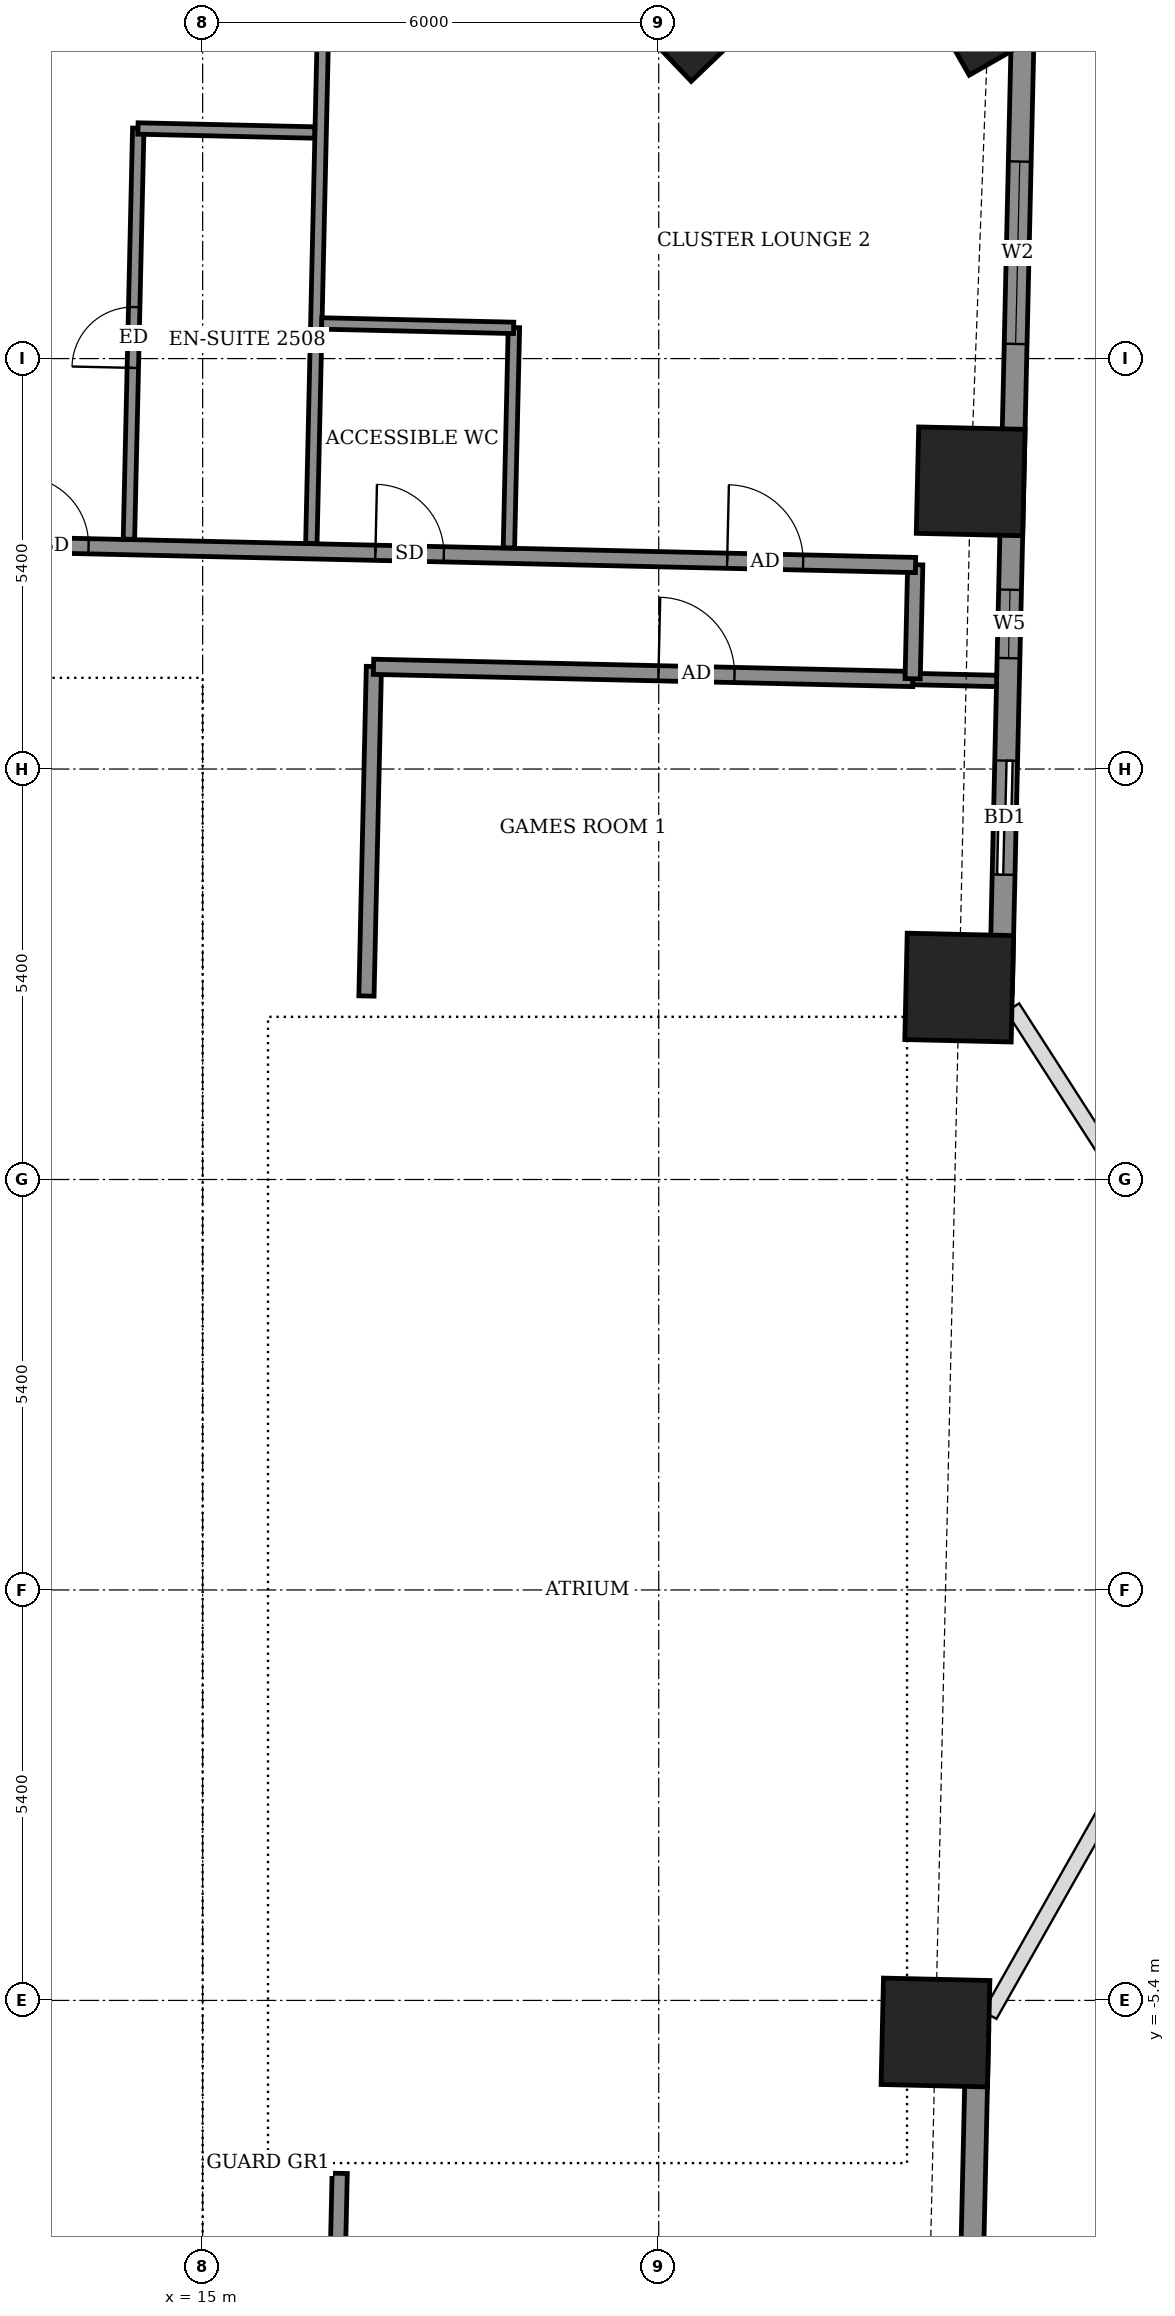
"""IFC4 building model, lengths in metres.
Left out: names, types, materials, properties, quantities, classifications, styles, units other than length and angle.
Written with IfcOpenShell. Run it as: python <this file> out.ifc"""

import sys

from ifc_helpers import new_model, si_unit, direction, frame, frame_2d, origin, origin_2d, place, context, subcontext, project, spatial, rectangle, extrude, element, fill, save


model = new_model("IFC4")
c1 = context("Model", 3, precision=1e-05, world=origin(), true_north=direction((0.0, 1.0)))
c2 = subcontext(c1, "Body", "Model", "MODEL_VIEW")
j1 = project(units=[si_unit("LENGTHUNIT", "METRE"), si_unit("PLANEANGLEUNIT", "RADIAN")], contexts=[c1])
p1 = place(None, origin())
s1 = spatial("IfcSite", under=j1, at=p1, CompositionType="ELEMENT")
p2 = place(p1, origin())
s2 = spatial("IfcBuilding", under=s1, at=p2, CompositionType="ELEMENT")
p3 = place(p2, frame((0.0, 0.0, 101.9)))
s3 = spatial("IfcBuildingStorey", under=s2, at=p3, CompositionType="ELEMENT", Elevation=101.9)
for number, where, z_axis, x_axis in (
    (1, (24.641, -5.822, -0.55), (0.0, 0.0, 1.0), (0.023, 1.0, 0.0)),
    (2, (24.953, 7.925, -0.55), (0.0, 0.0, 1.0), (0.023, 1.0, 0.0)),
    (3, (25.104, 14.585, -0.55), (0.0, 0.0, 1.0), (0.023, 1.0, 0.0)),
    (4, (25.347, 20.883, -0.55), (0.0, 0.0, 1.0), (-0.495, 0.869, 0.0)),
    (5, (21.45, 20.837, -0.55), (0.0, 0.0, 1.0), (-0.691, 0.723, 0.0)),
):
    element("IfcColumn", number, at=place(p3, frame(where, z_axis=z_axis, x_axis=x_axis)), inside=s3, PredefinedType="COLUMN", context=c2, shape_type="SweptSolid", body=[
        extrude(rectangle(XDim=1.4, YDim=1.4, at=origin_2d()), origin(), (0.0, 0.0, 1.0), 3.6),
    ])
p4 = place(p3, frame((24.915, -18.007, 0.0), z_axis=(0.0, 0.0, 1.0), x_axis=(0.02263706344, 0.999743748847, 0.0)))
e6 = element("IfcWall", 6, at=p4, inside=s3, PredefinedType="SOLIDWALL", context=c2, shape_type="SweptSolid", body=[
    extrude(rectangle(XDim=12.23, YDim=0.3, at=frame_2d((6.115, 0.0))), origin(), (0.0, 0.0, 1.0), 3.05),
])
p5 = place(p4, frame((2.213, 0.0, 0.0)))
e7 = element("IfcOpeningElement", 7, at=p5, cuts=e6, PredefinedType="OPENING", context=c2, shape_type="SweptSolid", body=[
    extrude(rectangle(XDim=1.5, YDim=2.4, at=frame_2d((0.75, 1.2))), frame((0.0, 0.16, 0.0), z_axis=(0.0, -1.0, 0.0), x_axis=(1.0, 0.0, 0.0)), (0.0, 0.0, 1.0), 0.32),
])
p6 = place(p4, frame((7.027, 0.0, 0.9)))
e8 = element("IfcOpeningElement", 8, at=p6, cuts=e6, PredefinedType="OPENING", context=c2, shape_type="SweptSolid", body=[
    extrude(rectangle(XDim=2.4, YDim=1.5, at=frame_2d((1.2, 0.75))), frame((0.0, 0.16, 0.0), z_axis=(0.0, -1.0, 0.0), x_axis=(1.0, 0.0, 0.0)), (0.0, 0.0, 1.0), 0.32),
])
p7 = place(p3, frame((25.502, 7.857, 0.0), z_axis=(0.0, 0.0, 1.0), x_axis=(0.022680323815, 0.999742768372, 0.0)))
e9 = element("IfcWall", 9, at=p7, inside=s3, PredefinedType="SOLIDWALL", context=c2, shape_type="SweptSolid", body=[
    extrude(rectangle(XDim=13.229, YDim=0.3, at=frame_2d((6.615, 0.0))), origin(), (0.0, 0.0, 1.0), 3.05),
])
p8 = place(p7, frame((1.554, 0.0, 0.0)))
e10 = element("IfcOpeningElement", 10, at=p8, cuts=e9, PredefinedType="OPENING", context=c2, shape_type="SweptSolid", body=[
    extrude(rectangle(XDim=1.5, YDim=2.4, at=frame_2d((0.75, 1.2))), frame((0.0, 0.16, 0.0), z_axis=(0.0, -1.0, 0.0), x_axis=(1.0, 0.0, 0.0)), (0.0, 0.0, 1.0), 0.32),
])
p9 = place(p7, frame((4.403, 0.0, 0.9)))
e11 = element("IfcOpeningElement", 11, at=p9, cuts=e9, PredefinedType="OPENING", context=c2, shape_type="SweptSolid", body=[
    extrude(rectangle(XDim=0.9, YDim=1.5, at=frame_2d((0.45, 0.75))), frame((0.0, 0.16, 0.0), z_axis=(0.0, -1.0, 0.0), x_axis=(1.0, 0.0, 0.0)), (0.0, 0.0, 1.0), 0.32),
])
p10 = place(p7, frame((8.538, 0.0, 0.9)))
e12 = element("IfcOpeningElement", 12, at=p10, cuts=e9, PredefinedType="OPENING", context=c2, shape_type="SweptSolid", body=[
    extrude(rectangle(XDim=2.4, YDim=1.5, at=frame_2d((1.2, 0.75))), frame((0.0, 0.16, 0.0), z_axis=(0.0, -1.0, 0.0), x_axis=(1.0, 0.0, 0.0)), (0.0, 0.0, 1.0), 0.32),
])
p11 = place(p3, frame((16.684, -12.919, 0.0), z_axis=(0.0, 0.0, 1.0), x_axis=(0.022667483124, 0.999743059595, 0.0)))
e13 = element("IfcWall", 13, at=p11, inside=s3, PredefinedType="PARTITIONING", context=c2, shape_type="SweptSolid", body=[
    extrude(rectangle(XDim=5.245, YDim=0.2, at=frame_2d((2.623, 0.0))), origin(), (0.0, 0.0, 1.0), 3.05),
])
p12 = place(p3, frame((17.155, 7.814, 0.0), z_axis=(0.0, 0.0, 1.0), x_axis=(0.022578158225, 0.999745080894, 0.0)))
e14 = element("IfcWall", 14, at=p12, inside=s3, PredefinedType="PARTITIONING", context=c2, shape_type="SweptSolid", body=[
    extrude(rectangle(XDim=4.336, YDim=0.2, at=frame_2d((2.168, 0.0))), origin(), (0.0, 0.0, 1.0), 3.05),
])
p13 = place(p3, frame((17.248, 12.145, 0.0), z_axis=(0.0, 0.0, 1.0), x_axis=(0.999742350192, -0.022698749566, 0.0)))
e15 = element("IfcWall", 15, at=p13, inside=s3, PredefinedType="PARTITIONING", context=c2, shape_type="SweptSolid", body=[
    extrude(rectangle(XDim=7.099, YDim=0.2, at=frame_2d((3.549, 0.0))), origin(), (0.0, 0.0, 1.0), 3.05),
])
p14 = place(p13, frame((3.75, 0.0, 0.0)))
e16 = element("IfcOpeningElement", 16, at=p14, cuts=e15, PredefinedType="OPENING", context=c2, shape_type="SweptSolid", body=[
    extrude(rectangle(XDim=1.0, YDim=2.1, at=frame_2d((0.5, 1.05))), frame((0.0, 0.11, 0.0), z_axis=(0.0, -1.0, 0.0), x_axis=(1.0, 0.0, 0.0)), (0.0, 0.0, 1.0), 0.22),
])
p15 = place(p3, frame((24.345, 11.984, 0.0), z_axis=(0.0, 0.0, 1.0), x_axis=(0.9997438932, -0.022630687329, 0.0)))
e17 = element("IfcWall", 17, at=p15, inside=s3, PredefinedType="PARTITIONING", context=c2, shape_type="SweptSolid", body=[
    extrude(rectangle(XDim=1.1, YDim=0.15, at=frame_2d((0.55, 0.0))), origin(), (0.0, 0.0, 1.0), 2.55),
])
p16 = place(p3, frame((24.341, 11.988, 0.0), z_axis=(0.0, 0.0, 1.0), x_axis=(0.022617910375, 0.999744182344, 0.0)))
e18 = element("IfcWall", 18, at=p16, inside=s3, PredefinedType="PARTITIONING", context=c2, shape_type="SweptSolid", body=[
    extrude(rectangle(XDim=1.5, YDim=0.2, at=frame_2d((0.75, 0.0))), origin(), (0.0, 0.0, 1.0), 3.05),
])
p17 = place(p3, frame((-26.316, 14.634, 0.0), z_axis=(0.0, 0.0, 1.0), x_axis=(0.999742734556, -0.02268181435, 0.0)))
e19 = element("IfcWall", 19, at=p17, inside=s3, PredefinedType="PARTITIONING", context=c2, shape_type="SweptSolid", body=[
    extrude(rectangle(XDim=50.708, YDim=0.2, at=frame_2d((25.354, 0.0))), origin(), (0.0, 0.0, 1.0), 3.05),
])
p18 = place(p17, frame((48.229, 0.0, 0.0)))
e20 = element("IfcOpeningElement", 20, at=p18, cuts=e19, PredefinedType="OPENING", context=c2, shape_type="SweptSolid", body=[
    extrude(rectangle(XDim=1.0, YDim=2.1, at=frame_2d((0.5, 1.05))), frame((0.0, 0.11, 0.0), z_axis=(0.0, -1.0, 0.0), x_axis=(1.0, 0.0, 0.0)), (0.0, 0.0, 1.0), 0.22),
])
p19 = place(p17, frame((43.6, 0.0, 0.0)))
e21 = element("IfcOpeningElement", 21, at=p19, cuts=e19, PredefinedType="OPENING", context=c2, shape_type="SweptSolid", body=[
    extrude(rectangle(XDim=0.9, YDim=2.1, at=frame_2d((0.45, 1.05))), frame((0.0, 0.11, 0.0), z_axis=(0.0, -1.0, 0.0), x_axis=(1.0, 0.0, 0.0)), (0.0, 0.0, 1.0), 0.22),
])
p20 = place(p17, frame((38.925, 0.0, 0.0)))
e22 = element("IfcOpeningElement", 22, at=p20, cuts=e19, PredefinedType="OPENING", context=c2, shape_type="SweptSolid", body=[
    extrude(rectangle(XDim=0.9, YDim=2.1, at=frame_2d((0.45, 1.05))), frame((0.0, 0.11, 0.0), z_axis=(0.0, -1.0, 0.0), x_axis=(1.0, 0.0, 0.0)), (0.0, 0.0, 1.0), 0.22),
])
p21 = place(p17, frame((36.9, 0.0, 0.0)))
e23 = element("IfcOpeningElement", 23, at=p21, cuts=e19, PredefinedType="OPENING", context=c2, shape_type="SweptSolid", body=[
    extrude(rectangle(XDim=0.9, YDim=2.1, at=frame_2d((0.45, 1.05))), frame((0.0, 0.11, 0.0), z_axis=(0.0, -1.0, 0.0), x_axis=(1.0, 0.0, 0.0)), (0.0, 0.0, 1.0), 0.22),
])
p22 = place(p17, frame((29.975, 0.0, 0.0)))
e24 = element("IfcOpeningElement", 24, at=p22, cuts=e19, PredefinedType="OPENING", context=c2, shape_type="SweptSolid", body=[
    extrude(rectangle(XDim=0.9, YDim=2.1, at=frame_2d((0.45, 1.05))), frame((0.0, 0.11, 0.0), z_axis=(0.0, -1.0, 0.0), x_axis=(1.0, 0.0, 0.0)), (0.0, 0.0, 1.0), 0.22),
])
p23 = place(p17, frame((27.9, 0.0, 0.0)))
e25 = element("IfcOpeningElement", 25, at=p23, cuts=e19, PredefinedType="OPENING", context=c2, shape_type="SweptSolid", body=[
    extrude(rectangle(XDim=0.9, YDim=2.1, at=frame_2d((0.45, 1.05))), frame((0.0, 0.11, 0.0), z_axis=(0.0, -1.0, 0.0), x_axis=(1.0, 0.0, 0.0)), (0.0, 0.0, 1.0), 0.22),
])
p24 = place(p17, frame((21.175, 0.0, 0.0)))
e26 = element("IfcOpeningElement", 26, at=p24, cuts=e19, PredefinedType="OPENING", context=c2, shape_type="SweptSolid", body=[
    extrude(rectangle(XDim=0.9, YDim=2.1, at=frame_2d((0.45, 1.05))), frame((0.0, 0.11, 0.0), z_axis=(0.0, -1.0, 0.0), x_axis=(1.0, 0.0, 0.0)), (0.0, 0.0, 1.0), 0.22),
])
p25 = place(p17, frame((19.25, 0.0, 0.0)))
e27 = element("IfcOpeningElement", 27, at=p25, cuts=e19, PredefinedType="OPENING", context=c2, shape_type="SweptSolid", body=[
    extrude(rectangle(XDim=0.9, YDim=2.1, at=frame_2d((0.45, 1.05))), frame((0.0, 0.11, 0.0), z_axis=(0.0, -1.0, 0.0), x_axis=(1.0, 0.0, 0.0)), (0.0, 0.0, 1.0), 0.22),
])
p26 = place(p17, frame((12.375, 0.0, 0.0)))
e28 = element("IfcOpeningElement", 28, at=p26, cuts=e19, PredefinedType="OPENING", context=c2, shape_type="SweptSolid", body=[
    extrude(rectangle(XDim=0.9, YDim=2.1, at=frame_2d((0.45, 1.05))), frame((0.0, 0.11, 0.0), z_axis=(0.0, -1.0, 0.0), x_axis=(1.0, 0.0, 0.0)), (0.0, 0.0, 1.0), 0.22),
])
p27 = place(p17, frame((10.225, 0.0, 0.0)))
e29 = element("IfcOpeningElement", 29, at=p27, cuts=e19, PredefinedType="OPENING", context=c2, shape_type="SweptSolid", body=[
    extrude(rectangle(XDim=0.9, YDim=2.1, at=frame_2d((0.45, 1.05))), frame((0.0, 0.11, 0.0), z_axis=(0.0, -1.0, 0.0), x_axis=(1.0, 0.0, 0.0)), (0.0, 0.0, 1.0), 0.22),
])
p28 = place(p17, frame((0.85, 0.0, 0.0)))
e30 = element("IfcOpeningElement", 30, at=p28, cuts=e19, PredefinedType="OPENING", context=c2, shape_type="SweptSolid", body=[
    extrude(rectangle(XDim=1.0, YDim=2.1, at=frame_2d((0.5, 1.05))), frame((0.0, 0.11, 0.0), z_axis=(0.0, -1.0, 0.0), x_axis=(1.0, 0.0, 0.0)), (0.0, 0.0, 1.0), 0.22),
])
p29 = place(p17, frame((5.55, 0.0, 0.0)))
e31 = element("IfcOpeningElement", 31, at=p29, cuts=e19, PredefinedType="OPENING", context=c2, shape_type="SweptSolid", body=[
    extrude(rectangle(XDim=0.9, YDim=2.1, at=frame_2d((0.45, 1.05))), frame((0.0, 0.11, 0.0), z_axis=(0.0, -1.0, 0.0), x_axis=(1.0, 0.0, 0.0)), (0.0, 0.0, 1.0), 0.22),
])
p30 = place(p3, frame((14.03, 13.823, 0.0), z_axis=(0.0, 0.0, 1.0), x_axis=(0.022747035861, 0.999741252705, 0.0)))
e32 = element("IfcWall", 32, at=p30, inside=s3, PredefinedType="PARTITIONING", context=c2, shape_type="SweptSolid", body=[
    extrude(rectangle(XDim=5.409, YDim=0.15, at=frame_2d((2.705, 0.0))), origin(), (0.0, 0.0, 1.0), 3.05),
])
p31 = place(p30, frame((2.255, 0.0, 0.0)))
e33 = element("IfcOpeningElement", 33, at=p31, cuts=e32, PredefinedType="OPENING", context=c2, shape_type="SweptSolid", body=[
    extrude(rectangle(XDim=0.8, YDim=2.1, at=frame_2d((0.4, 1.05))), frame((0.0, 0.085, 0.0), z_axis=(0.0, -1.0, 0.0), x_axis=(1.0, 0.0, 0.0)), (0.0, 0.0, 1.0), 0.17),
])
p32 = place(p3, frame((16.43, 13.768, 0.0), z_axis=(0.0, 0.0, 1.0), x_axis=(0.022624509406, 0.999744033028, 0.0)))
e34 = element("IfcWall", 34, at=p32, inside=s3, PredefinedType="PARTITIONING", context=c2, shape_type="SweptSolid", body=[
    extrude(rectangle(XDim=11.676, YDim=0.15, at=frame_2d((5.838, 0.0))), origin(), (0.0, 0.0, 1.0), 2.55),
])
p33 = place(p3, frame((19.029, 13.709, 0.0), z_axis=(0.0, 0.0, 1.0), x_axis=(0.022732880677, 0.999741574676, 0.0)))
e35 = element("IfcWall", 35, at=p33, inside=s3, PredefinedType="PARTITIONING", context=c2, shape_type="SweptSolid", body=[
    extrude(rectangle(XDim=2.9, YDim=0.15, at=frame_2d((1.45, 0.0))), origin(), (0.0, 0.0, 1.0), 3.05),
])
p34 = place(p3, frame((16.566, 16.662, 0.0), z_axis=(0.0, 0.0, 1.0), x_axis=(0.999735358199, -0.023004642294, 0.0)))
e36 = element("IfcWall", 36, at=p34, inside=s3, PredefinedType="PARTITIONING", context=c2, shape_type="SweptSolid", body=[
    extrude(rectangle(XDim=2.526, YDim=0.15, at=frame_2d((1.263, 0.0))), origin(), (0.0, 0.0, 1.0), 3.05),
])
p35 = place(p3, frame((14.149, 19.227, 0.0), z_axis=(0.0, 0.0, 1.0), x_axis=(0.999740260747, -0.02279059109, 0.0)))
e37 = element("IfcWall", 37, at=p35, inside=s3, PredefinedType="PARTITIONING", context=c2, shape_type="SweptSolid", body=[
    extrude(rectangle(XDim=2.324, YDim=0.15, at=frame_2d((1.162, 0.0))), origin(), (0.0, 0.0, 1.0), 3.05),
])
p36 = place(p3, frame((-14.8, 11.3, 0.0), z_axis=(0.0, 0.0, 1.0), x_axis=(1.0, 0.0, 0.0)))
e38 = element("IfcWall", 38, at=p36, inside=s3, PredefinedType="SHEAR", context=c2, shape_type="SweptSolid", body=[
    extrude(rectangle(XDim=29.6, YDim=1.0, at=frame_2d((14.8, 0.0))), origin(), (0.0, 0.0, 1.0), 3.6),
])
p37 = place(p3, frame((14.3, -10.8, 0.0), z_axis=(0.0, 0.0, 1.0), x_axis=(0.0, 1.0, 0.0)))
e39 = element("IfcWall", 39, at=p37, inside=s3, PredefinedType="SHEAR", context=c2, shape_type="SweptSolid", body=[
    extrude(rectangle(XDim=21.6, YDim=1.0, at=frame_2d((10.8, 0.0))), origin(), (0.0, 0.0, 1.0), 3.6),
])
p38 = place(p37, frame((1.2, 0.0, 0.0)))
e40 = element("IfcOpeningElement", 40, at=p38, cuts=e39, PredefinedType="OPENING", context=c2, shape_type="SweptSolid", body=[
    extrude(rectangle(XDim=1.2, YDim=2.1, at=frame_2d((0.6, 1.05))), frame((0.0, 0.51, 0.0), z_axis=(0.0, -1.0, 0.0), x_axis=(1.0, 0.0, 0.0)), (0.0, 0.0, 1.0), 1.02),
])
p39 = place(p8, origin())
e41 = element("IfcDoor", 41, at=p39, inside=s3, OperationType="SLIDING_TO_LEFT", PredefinedType="DOOR", context=c2, shape_type="SweptSolid", body=[
    extrude(rectangle(XDim=1.5, YDim=2.4, at=frame_2d((0.75, 1.2))), frame((0.0, 0.025, 0.0), z_axis=(0.0, -1.0, 0.0), x_axis=(1.0, 0.0, 0.0)), (0.0, 0.0, 1.0), 0.05),
])
fill(e10, e41)
p40 = place(p9, origin())
e42 = element("IfcWindow", 42, at=p40, inside=s3, PartitioningType="SINGLE_PANEL", PredefinedType="WINDOW", context=c2, shape_type="SweptSolid", body=[
    extrude(rectangle(XDim=0.9, YDim=1.5, at=frame_2d((0.45, 0.75))), frame((0.0, 0.03, 0.0), z_axis=(0.0, -1.0, 0.0), x_axis=(1.0, 0.0, 0.0)), (0.0, 0.0, 1.0), 0.06),
])
fill(e11, e42)
p41 = place(p10, origin())
e43 = element("IfcWindow", 43, at=p41, inside=s3, PartitioningType="DOUBLE_PANEL_VERTICAL", PredefinedType="WINDOW", context=c2, shape_type="SweptSolid", body=[
    extrude(rectangle(XDim=2.4, YDim=1.5, at=frame_2d((1.2, 0.75))), frame((0.0, 0.03, 0.0), z_axis=(0.0, -1.0, 0.0), x_axis=(1.0, 0.0, 0.0)), (0.0, 0.0, 1.0), 0.06),
])
fill(e12, e43)
p42 = place(p14, origin())
e44 = element("IfcDoor", 44, at=p42, inside=s3, OperationType="SINGLE_SWING_RIGHT", PredefinedType="DOOR", context=c2, shape_type="SweptSolid", body=[
    extrude(rectangle(XDim=1.0, YDim=2.1, at=frame_2d((0.5, 1.05))), frame((0.0, 0.025, 0.0), z_axis=(0.0, -1.0, 0.0), x_axis=(1.0, 0.0, 0.0)), (0.0, 0.0, 1.0), 0.05),
])
fill(e16, e44)
p43 = place(p18, origin())
e45 = element("IfcDoor", 45, at=p43, inside=s3, OperationType="SINGLE_SWING_LEFT", PredefinedType="DOOR", context=c2, shape_type="SweptSolid", body=[
    extrude(rectangle(XDim=1.0, YDim=2.1, at=frame_2d((0.5, 1.05))), frame((0.0, 0.025, 0.0), z_axis=(0.0, -1.0, 0.0), x_axis=(1.0, 0.0, 0.0)), (0.0, 0.0, 1.0), 0.05),
])
fill(e20, e45)
p44 = place(p19, origin())
e46 = element("IfcDoor", 46, at=p44, inside=s3, OperationType="SINGLE_SWING_RIGHT", PredefinedType="DOOR", context=c2, shape_type="SweptSolid", body=[
    extrude(rectangle(XDim=0.9, YDim=2.1, at=frame_2d((0.45, 1.05))), frame((0.0, 0.025, 0.0), z_axis=(0.0, -1.0, 0.0), x_axis=(1.0, 0.0, 0.0)), (0.0, 0.0, 1.0), 0.05),
])
fill(e21, e46)
p45 = place(p20, origin())
e47 = element("IfcDoor", 47, at=p45, inside=s3, OperationType="SINGLE_SWING_RIGHT", PredefinedType="DOOR", context=c2, shape_type="SweptSolid", body=[
    extrude(rectangle(XDim=0.9, YDim=2.1, at=frame_2d((0.45, 1.05))), frame((0.0, 0.025, 0.0), z_axis=(0.0, -1.0, 0.0), x_axis=(1.0, 0.0, 0.0)), (0.0, 0.0, 1.0), 0.05),
])
fill(e22, e47)
p46 = place(p31, origin())
e48 = element("IfcDoor", 48, at=p46, inside=s3, OperationType="SINGLE_SWING_RIGHT", PredefinedType="DOOR", context=c2, shape_type="SweptSolid", body=[
    extrude(rectangle(XDim=0.8, YDim=2.1, at=frame_2d((0.4, 1.05))), frame((0.0, 0.025, 0.0), z_axis=(0.0, -1.0, 0.0), x_axis=(1.0, 0.0, 0.0)), (0.0, 0.0, 1.0), 0.05),
])
fill(e33, e48)
p47 = place(p38, origin())
e49 = element("IfcDoor", 49, at=p47, inside=s3, OperationType="DOUBLE_DOOR_SINGLE_SWING", PredefinedType="DOOR", context=c2, shape_type="SweptSolid", body=[
    extrude(rectangle(XDim=1.2, YDim=2.1, at=frame_2d((0.6, 1.05))), frame((0.0, 0.025, 0.0), z_axis=(0.0, -1.0, 0.0), x_axis=(1.0, 0.0, 0.0)), (0.0, 0.0, 1.0), 0.05),
])
fill(e40, e49)
save(model, sys.argv[1])
